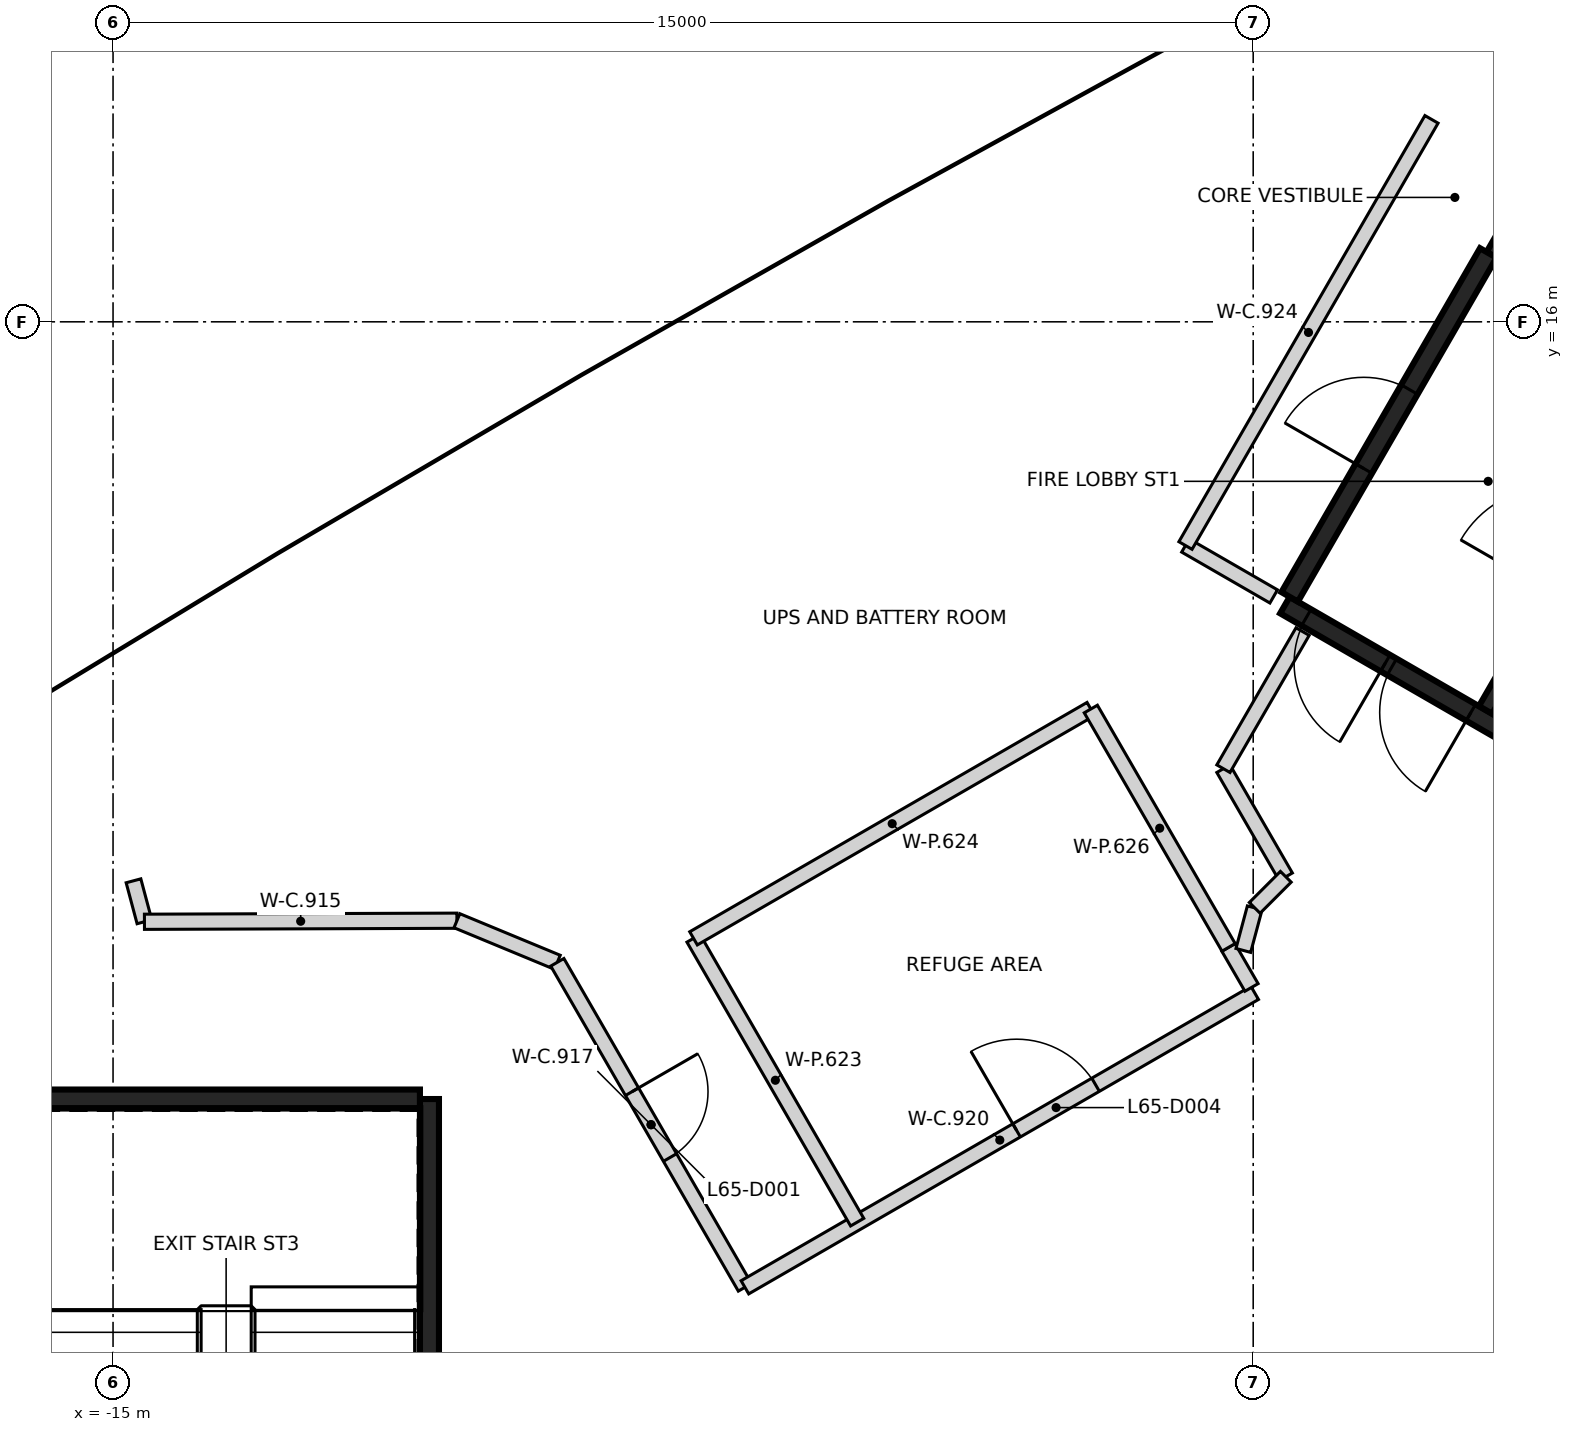
"""IFC4 building model, lengths in metres.
Left out: names, types, materials, properties, quantities, classifications, styles, units other than length and angle.
Written with IfcOpenShell. Run it as: python <this file> out.ifc"""

import sys

from ifc_helpers import new_model, si_unit, direction, frame, frame_2d, origin, place, context, subcontext, project, spatial, rectangle, extrude, element, fill, save


model = new_model("IFC4")
c1 = context("Model", 3, precision=1e-05, world=origin(), true_north=direction((0.0, 1.0)))
c2 = subcontext(c1, "Body", "Model", "MODEL_VIEW")
j1 = project(units=[si_unit("LENGTHUNIT", "METRE"), si_unit("PLANEANGLEUNIT", "RADIAN")], contexts=[c1])
p1 = place(None, origin())
s1 = spatial("IfcSite", under=j1, at=p1, CompositionType="ELEMENT")
p2 = place(p1, origin())
s2 = spatial("IfcBuilding", under=s1, at=p2, CompositionType="ELEMENT")
p3 = place(p2, frame((0.0, 0.0, 257.4)))
s3 = spatial("IfcBuildingStorey", under=s2, at=p3, CompositionType="ELEMENT", Elevation=257.4)
p4 = place(p3, frame((-10.837, 5.775, 0.0), z_axis=(0.0, 0.0, 1.0), x_axis=(0.0, -1.0, 0.0)))
e1 = element("IfcWall", 1, at=p4, inside=s3, PredefinedType="SHEAR", context=c2, shape_type="SweptSolid", body=[
    extrude(rectangle(XDim=11.55, YDim=0.25, at=frame_2d((5.775, 0.0))), origin(), (0.0, 0.0, 1.0), 4.45),
])
p5 = place(p4, frame((10.025, 0.0, 0.0)))
e2 = element("IfcOpeningElement", 2, at=p5, cuts=e1, PredefinedType="OPENING", context=c2, shape_type="SweptSolid", body=[
    extrude(rectangle(XDim=1.2, YDim=2.1, at=frame_2d((0.6, 1.05))), frame((0.0, 0.135, 0.0), z_axis=(0.0, -1.0, 0.0), x_axis=(1.0, 0.0, 0.0)), (0.0, 0.0, 1.0), 0.27),
])
p6 = place(p4, frame((8.725, 0.0, 0.0)))
e3 = element("IfcOpeningElement", 3, at=p6, cuts=e1, PredefinedType="OPENING", context=c2, shape_type="SweptSolid", body=[
    extrude(rectangle(XDim=1.2, YDim=2.1, at=frame_2d((0.6, 1.05))), frame((0.0, 0.135, 0.0), z_axis=(0.0, -1.0, 0.0), x_axis=(1.0, 0.0, 0.0)), (0.0, 0.0, 1.0), 0.27),
])
p7 = place(p3, frame((-16.472, 5.775, 0.0), z_axis=(0.0, 0.0, 1.0), x_axis=(1.0, 0.0, 0.0)))
e4 = element("IfcWall", 4, at=p7, inside=s3, PredefinedType="SHEAR", context=c2, shape_type="SweptSolid", body=[
    extrude(rectangle(XDim=5.51, YDim=0.25, at=frame_2d((2.755, 0.0))), origin(), (0.0, 0.0, 1.0), 4.45),
])
p8 = place(p3, frame((10.42, 6.498, 0.0), z_axis=(0.0, 0.0, 1.0), x_axis=(-0.866021906294, 0.500006057782, 0.0)))
e5 = element("IfcWall", 5, at=p8, inside=s3, PredefinedType="SHEAR", context=c2, shape_type="SweptSolid", body=[
    extrude(rectangle(XDim=11.55, YDim=0.25, at=frame_2d((5.775, 0.0))), origin(), (0.0, 0.0, 1.0), 4.45),
])
p9 = place(p8, frame((10.025, 0.0, 0.0)))
e6 = element("IfcOpeningElement", 6, at=p9, cuts=e5, PredefinedType="OPENING", context=c2, shape_type="SweptSolid", body=[
    extrude(rectangle(XDim=1.2, YDim=2.1, at=frame_2d((0.6, 1.05))), frame((0.0, 0.135, 0.0), z_axis=(0.0, -1.0, 0.0), x_axis=(1.0, 0.0, 0.0)), (0.0, 0.0, 1.0), 0.27),
])
p10 = place(p8, frame((8.725, 0.0, 0.0)))
e7 = element("IfcOpeningElement", 7, at=p10, cuts=e5, PredefinedType="OPENING", context=c2, shape_type="SweptSolid", body=[
    extrude(rectangle(XDim=1.2, YDim=2.1, at=frame_2d((0.6, 1.05))), frame((0.0, 0.135, 0.0), z_axis=(0.0, -1.0, 0.0), x_axis=(1.0, 0.0, 0.0)), (0.0, 0.0, 1.0), 0.27),
])
p11 = place(p3, frame((3.179, 16.856, 0.0), z_axis=(0.0, 0.0, 1.0), x_axis=(0.500001955336, 0.866024274868, 0.0)))
e8 = element("IfcWall", 8, at=p11, inside=s3, PredefinedType="SHEAR", context=c2, shape_type="SweptSolid", body=[
    extrude(rectangle(XDim=6.125, YDim=0.25, at=frame_2d((3.062, 0.0))), origin(), (0.0, 0.0, 1.0), 4.45),
])
p12 = place(p11, frame((3.563, 0.0, 0.0)))
e9 = element("IfcOpeningElement", 9, at=p12, cuts=e8, PredefinedType="OPENING", context=c2, shape_type="SweptSolid", body=[
    extrude(rectangle(XDim=1.0, YDim=2.1, at=frame_2d((0.5, 1.05))), frame((0.0, 0.135, 0.0), z_axis=(0.0, -1.0, 0.0), x_axis=(1.0, 0.0, 0.0)), (0.0, 0.0, 1.0), 0.27),
])
p13 = place(p3, frame((0.48, 12.381, 0.0), z_axis=(0.0, 0.0, 1.0), x_axis=(0.49999885962, 0.866026062182, 0.0)))
e10 = element("IfcWall", 10, at=p13, inside=s3, PredefinedType="SHEAR", context=c2, shape_type="SweptSolid", body=[
    extrude(rectangle(XDim=5.225, YDim=0.25, at=frame_2d((2.612, 0.0))), origin(), (0.0, 0.0, 1.0), 4.45),
])
p14 = place(p13, frame((1.95, 0.0, 0.0)))
e11 = element("IfcOpeningElement", 11, at=p14, cuts=e10, PredefinedType="OPENING", context=c2, shape_type="SweptSolid", body=[
    extrude(rectangle(XDim=1.2, YDim=2.1, at=frame_2d((0.6, 1.05))), frame((0.0, 0.135, 0.0), z_axis=(0.0, -1.0, 0.0), x_axis=(1.0, 0.0, 0.0)), (0.0, 0.0, 1.0), 0.27),
])
p15 = place(p3, frame((3.057, 10.895, 0.0), z_axis=(0.0, 0.0, 1.0), x_axis=(0.500027839223, 0.866009330205, 0.0)))
e12 = element("IfcWall", 12, at=p15, inside=s3, PredefinedType="SHEAR", context=c2, shape_type="SweptSolid", body=[
    extrude(rectangle(XDim=5.098, YDim=0.2, at=frame_2d((2.549, 0.0))), origin(), (0.0, 0.0, 1.0), 4.45),
])
p16 = place(p15, frame((1.774, 0.0, 0.0)))
e13 = element("IfcOpeningElement", 13, at=p16, cuts=e12, PredefinedType="OPENING", context=c2, shape_type="SweptSolid", body=[
    extrude(rectangle(XDim=1.4, YDim=2.1, at=frame_2d((0.7, 1.05))), frame((0.0, 0.11, 0.0), z_axis=(0.0, -1.0, 0.0), x_axis=(1.0, 0.0, 0.0)), (0.0, 0.0, 1.0), 0.22),
])
p17 = place(p3, frame((-14.731, 8.646, 0.0), z_axis=(0.0, 0.0, 1.0), x_axis=(0.258152815448, -0.966104095777, 0.0)))
e14 = element("IfcWall", 14, at=p17, inside=s3, PredefinedType="PARTITIONING", context=c2, shape_type="SweptSolid", body=[
    extrude(rectangle(XDim=0.558, YDim=0.2, at=frame_2d((0.279, 0.0))), origin(), (0.0, 0.0, 1.0), 4.45),
])
p18 = place(p3, frame((-14.587, 8.107, 0.0), z_axis=(0.0, 0.0, 1.0), x_axis=(0.999994067454, 0.003444569184, 0.0)))
e15 = element("IfcWall", 15, at=p18, inside=s3, PredefinedType="PARTITIONING", context=c2, shape_type="SweptSolid", body=[
    extrude(rectangle(XDim=4.111, YDim=0.2, at=frame_2d((2.055, 0.0))), origin(), (0.0, 0.0, 1.0), 4.45),
])
p19 = place(p3, frame((-10.476, 8.121, 0.0), z_axis=(0.0, 0.0, 1.0), x_axis=(0.923898220274, -0.382638312998, 0.0)))
e16 = element("IfcWall", 16, at=p19, inside=s3, PredefinedType="PARTITIONING", context=c2, shape_type="SweptSolid", body=[
    extrude(rectangle(XDim=1.43, YDim=0.2, at=frame_2d((0.715, 0.0))), origin(), (0.0, 0.0, 1.0), 4.45),
])
p20 = place(p3, frame((-9.155, 7.574, 0.0), z_axis=(0.0, 0.0, 1.0), x_axis=(0.499899390653, -0.866083482827, 0.0)))
e17 = element("IfcWall", 17, at=p20, inside=s3, PredefinedType="PARTITIONING", context=c2, shape_type="SweptSolid", body=[
    extrude(rectangle(XDim=4.937, YDim=0.2, at=frame_2d((2.469, 0.0))), origin(), (0.0, 0.0, 1.0), 4.45),
])
p21 = place(p20, frame((1.966, 0.0, 0.0)))
e18 = element("IfcOpeningElement", 18, at=p21, cuts=e17, PredefinedType="OPENING", context=c2, shape_type="SweptSolid", body=[
    extrude(rectangle(XDim=1.0, YDim=2.1, at=frame_2d((0.5, 1.05))), frame((0.0, 0.11, 0.0), z_axis=(0.0, -1.0, 0.0), x_axis=(1.0, 0.0, 0.0)), (0.0, 0.0, 1.0), 0.22),
])
p22 = place(p3, frame((-6.687, 3.298, 0.0), z_axis=(0.0, 0.0, 1.0), x_axis=(0.865948809334, 0.500132642019, 0.0)))
e19 = element("IfcWall", 19, at=p22, inside=s3, PredefinedType="PARTITIONING", context=c2, shape_type="SweptSolid", body=[
    extrude(rectangle(XDim=7.745, YDim=0.2, at=frame_2d((3.873, 0.0))), origin(), (0.0, 0.0, 1.0), 4.45),
])
p23 = place(p22, frame((4.128, 0.0, 0.0)))
e20 = element("IfcOpeningElement", 20, at=p23, cuts=e19, PredefinedType="OPENING", context=c2, shape_type="SweptSolid", body=[
    extrude(rectangle(XDim=1.2, YDim=2.1, at=frame_2d((0.6, 1.05))), frame((0.0, 0.11, 0.0), z_axis=(0.0, -1.0, 0.0), x_axis=(1.0, 0.0, 0.0)), (0.0, 0.0, 1.0), 0.22),
])
p24 = place(p3, frame((-0.891, 13.057, 0.0), z_axis=(0.0, 0.0, 1.0), x_axis=(0.866206814563, -0.499685655593, 0.0)))
e21 = element("IfcWall", 21, at=p24, inside=s3, PredefinedType="PARTITIONING", context=c2, shape_type="SweptSolid", body=[
    extrude(rectangle(XDim=1.34, YDim=0.2, at=frame_2d((0.67, 0.0))), origin(), (0.0, 0.0, 1.0), 4.45),
])
p25 = place(p3, frame((-0.891, 13.057, 0.0), z_axis=(0.0, 0.0, 1.0), x_axis=(0.499975989083, 0.86603926605, 0.0)))
e22 = element("IfcWall", 22, at=p25, inside=s3, PredefinedType="PARTITIONING", context=c2, shape_type="SweptSolid", body=[
    extrude(rectangle(XDim=6.474, YDim=0.2, at=frame_2d((3.237, 0.0))), origin(), (0.0, 0.0, 1.0), 4.45),
])
p26 = place(p3, frame((-0.392, 10.121, 0.0), z_axis=(0.0, 0.0, 1.0), x_axis=(0.499992716633, -0.866029608798, 0.0)))
e23 = element("IfcWall", 23, at=p26, inside=s3, PredefinedType="PARTITIONING", context=c2, shape_type="SweptSolid", body=[
    extrude(rectangle(XDim=1.642, YDim=0.2, at=frame_2d((0.821, 0.0))), origin(), (0.0, 0.0, 1.0), 4.45),
])
p27 = place(p3, frame((-0.392, 10.121, 0.0), z_axis=(0.0, 0.0, 1.0), x_axis=(0.50017216111, 0.865925983702, 0.0)))
e24 = element("IfcWall", 24, at=p27, inside=s3, PredefinedType="PARTITIONING", context=c2, shape_type="SweptSolid", body=[
    extrude(rectangle(XDim=2.083, YDim=0.2, at=frame_2d((1.042, 0.0))), origin(), (0.0, 0.0, 1.0), 4.45),
])
p28 = place(p3, frame((-0.326, 7.769, 0.0), z_axis=(0.0, 0.0, 1.0), x_axis=(0.500244126355, -0.865884411482, 0.0)))
e25 = element("IfcWall", 25, at=p28, inside=s3, PredefinedType="PARTITIONING", context=c2, shape_type="SweptSolid", body=[
    extrude(rectangle(XDim=0.608, YDim=0.2, at=frame_2d((0.304, 0.0))), origin(), (0.0, 0.0, 1.0), 4.45),
])
p29 = place(p3, frame((-0.13, 7.73, 0.0), z_axis=(0.0, 0.0, 1.0), x_axis=(0.258553659464, 0.965996897085, 0.0)))
e26 = element("IfcWall", 26, at=p29, inside=s3, PredefinedType="PARTITIONING", context=c2, shape_type="SweptSolid", body=[
    extrude(rectangle(XDim=0.58, YDim=0.2, at=frame_2d((0.29, 0.0))), origin(), (0.0, 0.0, 1.0), 4.45),
])
p30 = place(p3, frame((0.02, 8.29, 0.0), z_axis=(0.0, 0.0, 1.0), x_axis=(0.707106781187, 0.707106781187, 0.0)))
e27 = element("IfcWall", 27, at=p30, inside=s3, PredefinedType="PARTITIONING", context=c2, shape_type="SweptSolid", body=[
    extrude(rectangle(XDim=0.578, YDim=0.2, at=frame_2d((0.289, 0.0))), origin(), (0.0, 0.0, 1.0), 4.45),
])
p31 = place(p3, frame((-7.363, 7.889, 0.0), z_axis=(0.0, 0.0, 1.0), x_axis=(0.49953283588, -0.866294953164, 0.0)))
e28 = element("IfcWall", 28, at=p31, inside=s3, PredefinedType="PARTITIONING", context=c2, shape_type="SweptSolid", body=[
    extrude(rectangle(XDim=4.31, YDim=0.2, at=frame_2d((2.155, 0.0))), origin(), (0.0, 0.0, 1.0), 4.45),
])
p32 = place(p3, frame((-7.363, 7.889, 0.0), z_axis=(0.0, 0.0, 1.0), x_axis=(0.866079160815, 0.499906878531, 0.0)))
e29 = element("IfcWall", 29, at=p32, inside=s3, PredefinedType="PARTITIONING", context=c2, shape_type="SweptSolid", body=[
    extrude(rectangle(XDim=6.035, YDim=0.2, at=frame_2d((3.018, 0.0))), origin(), (0.0, 0.0, 1.0), 4.45),
])
p33 = place(p3, frame((-2.136, 10.906, 0.0), z_axis=(0.0, 0.0, 1.0), x_axis=(0.500379794091, -0.865806018497, 0.0)))
e30 = element("IfcWall", 30, at=p33, inside=s3, PredefinedType="PARTITIONING", context=c2, shape_type="SweptSolid", body=[
    extrude(rectangle(XDim=3.622, YDim=0.2, at=frame_2d((1.811, 0.0))), origin(), (0.0, 0.0, 1.0), 4.45),
])
p34 = place(p9, origin())
e31 = element("IfcDoor", 31, at=p34, inside=s3, OperationType="SINGLE_SWING_LEFT", PredefinedType="DOOR", context=c2, shape_type="SweptSolid", body=[
    extrude(rectangle(XDim=1.2, YDim=2.1, at=frame_2d((0.6, 1.05))), frame((0.0, 0.025, 0.0), z_axis=(0.0, -1.0, 0.0), x_axis=(1.0, 0.0, 0.0)), (0.0, 0.0, 1.0), 0.05),
])
fill(e6, e31)
p35 = place(p10, origin())
e32 = element("IfcDoor", 32, at=p35, inside=s3, OperationType="SINGLE_SWING_RIGHT", PredefinedType="DOOR", context=c2, shape_type="SweptSolid", body=[
    extrude(rectangle(XDim=1.2, YDim=2.1, at=frame_2d((0.6, 1.05))), frame((0.0, 0.025, 0.0), z_axis=(0.0, -1.0, 0.0), x_axis=(1.0, 0.0, 0.0)), (0.0, 0.0, 1.0), 0.05),
])
fill(e7, e32)
p36 = place(p14, origin())
e33 = element("IfcDoor", 33, at=p36, inside=s3, OperationType="SINGLE_SWING_LEFT", PredefinedType="DOOR", context=c2, shape_type="SweptSolid", body=[
    extrude(rectangle(XDim=1.2, YDim=2.1, at=frame_2d((0.6, 1.05))), frame((0.0, 0.025, 0.0), z_axis=(0.0, -1.0, 0.0), x_axis=(1.0, 0.0, 0.0)), (0.0, 0.0, 1.0), 0.05),
])
fill(e11, e33)
p37 = place(p21, origin())
e34 = element("IfcDoor", 34, at=p37, inside=s3, OperationType="SINGLE_SWING_LEFT", PredefinedType="DOOR", context=c2, shape_type="SweptSolid", body=[
    extrude(rectangle(XDim=1.0, YDim=2.1, at=frame_2d((0.5, 1.05))), frame((0.0, 0.025, 0.0), z_axis=(0.0, -1.0, 0.0), x_axis=(1.0, 0.0, 0.0)), (0.0, 0.0, 1.0), 0.05),
])
fill(e18, e34)
p38 = place(p23, origin())
e35 = element("IfcDoor", 35, at=p38, inside=s3, OperationType="SINGLE_SWING_LEFT", PredefinedType="DOOR", context=c2, shape_type="SweptSolid", body=[
    extrude(rectangle(XDim=1.2, YDim=2.1, at=frame_2d((0.6, 1.05))), frame((0.0, 0.025, 0.0), z_axis=(0.0, -1.0, 0.0), x_axis=(1.0, 0.0, 0.0)), (0.0, 0.0, 1.0), 0.05),
])
fill(e20, e35)
save(model, sys.argv[1])
